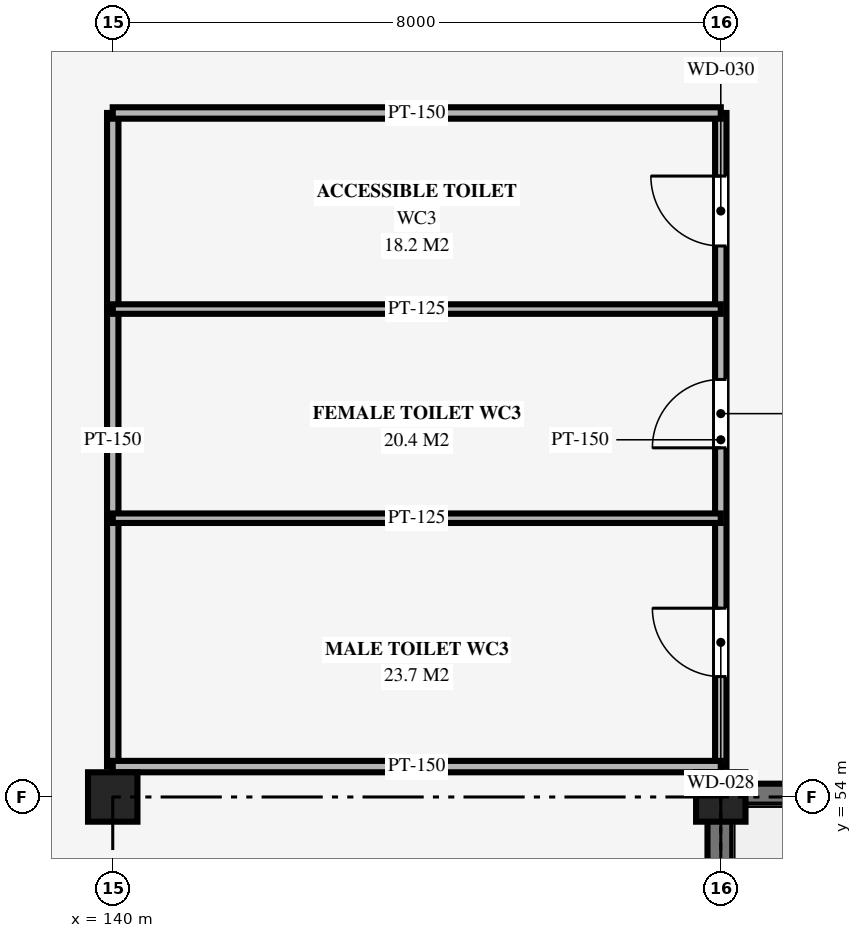
"""IFC4 building model, lengths in metres.
Left out: names, types, materials, properties, quantities, classifications, styles, units other than length and angle.
Written with IfcOpenShell. Run it as: python <this file> out.ifc"""

import sys

from ifc_helpers import new_model, si_unit, direction, frame, frame_2d, origin, origin_2d, place, context, subcontext, project, spatial, rectangle, extrude, element, fill, save


model = new_model("IFC4")
c1 = context("Model", 3, precision=1e-05, world=origin(), true_north=direction((0.0, 1.0)))
c2 = subcontext(c1, "Body", "Model", "MODEL_VIEW")
j1 = project(units=[si_unit("LENGTHUNIT", "METRE"), si_unit("PLANEANGLEUNIT", "RADIAN")], contexts=[c1])
p1 = place(None, origin())
s1 = spatial("IfcSite", under=j1, at=p1, CompositionType="ELEMENT")
p2 = place(p1, origin())
s2 = spatial("IfcBuilding", under=s1, at=p2, CompositionType="ELEMENT")
p3 = place(p2, origin())
s3 = spatial("IfcBuildingStorey", under=s2, at=p3, CompositionType="ELEMENT", Elevation=0.0)
for number, where, z_axis, x_axis in (
    (1, (140.0, 54.0, 0.0), (0.0, 0.0, 1.0), (1.0, 0.0, 0.0)),
    (2, (148.0, 54.0, 0.0), (0.0, 0.0, 1.0), (1.0, 0.0, 0.0)),
):
    element("IfcColumn", number, at=place(p3, frame(where, z_axis=z_axis, x_axis=x_axis)), inside=s3, PredefinedType="COLUMN", context=c2, shape_type="SweptSolid", body=[
        extrude(rectangle(XDim=0.65, YDim=0.65, at=origin_2d()), origin(), (0.0, 0.0, 1.0), 5.24),
    ])
p4 = place(p3, frame((148.0, 54.0, 0.0), z_axis=(0.0, 0.0, 1.0), x_axis=(1.0, 0.0, 0.0)))
e3 = element("IfcWall", 3, at=p4, inside=s3, PredefinedType="SHEAR", context=c2, shape_type="SweptSolid", body=[
    extrude(rectangle(XDim=8.0, YDim=0.35, at=frame_2d((4.0, 0.0))), origin(), (0.0, 0.0, 1.0), 5.38),
])
p5 = place(p3, frame((148.0, 42.0, 0.0), z_axis=(0.0, 0.0, 1.0), x_axis=(0.0, 1.0, 0.0)))
e4 = element("IfcWall", 4, at=p5, inside=s3, PredefinedType="SHEAR", context=c2, shape_type="SweptSolid", body=[
    extrude(rectangle(XDim=12.0, YDim=0.35, at=frame_2d((6.0, 0.0))), origin(), (0.0, 0.0, 1.0), 5.38),
])
p6 = place(p3, frame((140.0, 54.4, 0.0), z_axis=(0.0, 0.0, 1.0), x_axis=(0.0, 1.0, 0.0)))
e5 = element("IfcWall", 5, at=p6, inside=s3, PredefinedType="PARTITIONING", context=c2, shape_type="SweptSolid", body=[
    extrude(rectangle(XDim=8.6, YDim=0.15, at=frame_2d((4.3, 0.0))), origin(), (0.0, 0.0, 1.0), 4.2),
])
p7 = place(p3, frame((148.0, 54.4, 0.0), z_axis=(0.0, 0.0, 1.0), x_axis=(0.0, 1.0, 0.0)))
e6 = element("IfcWall", 6, at=p7, inside=s3, PredefinedType="PARTITIONING", context=c2, shape_type="SweptSolid", body=[
    extrude(rectangle(XDim=8.6, YDim=0.15, at=frame_2d((4.3, 0.0))), origin(), (0.0, 0.0, 1.0), 4.2),
])
p8 = place(p7, frame((1.184, 0.0, 0.0)))
e7 = element("IfcOpeningElement", 7, at=p8, cuts=e6, PredefinedType="OPENING", context=c2, shape_type="SweptSolid", body=[
    extrude(rectangle(XDim=0.9, YDim=2.1, at=frame_2d((0.45, 1.05))), frame((0.0, 0.085, 0.0), z_axis=(0.0, -1.0, 0.0), x_axis=(1.0, 0.0, 0.0)), (0.0, 0.0, 1.0), 0.17),
])
p9 = place(p7, frame((4.194, 0.0, 0.0)))
e8 = element("IfcOpeningElement", 8, at=p9, cuts=e6, PredefinedType="OPENING", context=c2, shape_type="SweptSolid", body=[
    extrude(rectangle(XDim=0.9, YDim=2.1, at=frame_2d((0.45, 1.05))), frame((0.0, 0.085, 0.0), z_axis=(0.0, -1.0, 0.0), x_axis=(1.0, 0.0, 0.0)), (0.0, 0.0, 1.0), 0.17),
])
p10 = place(p7, frame((6.85, 0.0, 0.0)))
e9 = element("IfcOpeningElement", 9, at=p10, cuts=e6, PredefinedType="OPENING", context=c2, shape_type="SweptSolid", body=[
    extrude(rectangle(XDim=0.92, YDim=2.1, at=frame_2d((0.46, 1.05))), frame((0.0, 0.085, 0.0), z_axis=(0.0, -1.0, 0.0), x_axis=(1.0, 0.0, 0.0)), (0.0, 0.0, 1.0), 0.17),
])
for number, where, z_axis, x_axis in (
    (10, (140.0, 63.0, 0.0), (0.0, 0.0, 1.0), (1.0, 0.0, 0.0)),
    (11, (140.0, 54.4, 0.0), (0.0, 0.0, 1.0), (1.0, 0.0, 0.0)),
):
    element("IfcWall", number, at=place(p3, frame(where, z_axis=z_axis, x_axis=x_axis)), inside=s3, PredefinedType="PARTITIONING", context=c2, shape_type="SweptSolid", body=[
        extrude(rectangle(XDim=8.0, YDim=0.15, at=frame_2d((4.0, 0.0))), origin(), (0.0, 0.0, 1.0), 4.2),
    ])
for number, where, z_axis, x_axis in (
    (12, (140.0, 57.668, 0.0), (0.0, 0.0, 1.0), (1.0, 0.0, 0.0)),
    (13, (140.0, 60.42, 0.0), (0.0, 0.0, 1.0), (1.0, 0.0, 0.0)),
):
    element("IfcWall", number, at=place(p3, frame(where, z_axis=z_axis, x_axis=x_axis)), inside=s3, PredefinedType="PARTITIONING", context=c2, shape_type="SweptSolid", body=[
        extrude(rectangle(XDim=8.0, YDim=0.125, at=frame_2d((4.0, 0.0))), origin(), (0.0, 0.0, 1.0), 4.2),
    ])
p11 = place(p8, origin())
e14 = element("IfcDoor", 14, at=p11, inside=s3, OperationType="SINGLE_SWING_RIGHT", PredefinedType="DOOR", context=c2, shape_type="SweptSolid", body=[
    extrude(rectangle(XDim=0.9, YDim=2.1, at=frame_2d((0.45, 1.05))), frame((0.0, 0.025, 0.0), z_axis=(0.0, -1.0, 0.0), x_axis=(1.0, 0.0, 0.0)), (0.0, 0.0, 1.0), 0.05),
])
fill(e7, e14)
p12 = place(p9, origin())
e15 = element("IfcDoor", 15, at=p12, inside=s3, OperationType="SINGLE_SWING_LEFT", PredefinedType="DOOR", context=c2, shape_type="SweptSolid", body=[
    extrude(rectangle(XDim=0.9, YDim=2.1, at=frame_2d((0.45, 1.05))), frame((0.0, 0.025, 0.0), z_axis=(0.0, -1.0, 0.0), x_axis=(1.0, 0.0, 0.0)), (0.0, 0.0, 1.0), 0.05),
])
fill(e8, e15)
p13 = place(p10, origin())
e16 = element("IfcDoor", 16, at=p13, inside=s3, OperationType="SINGLE_SWING_RIGHT", PredefinedType="DOOR", context=c2, shape_type="SweptSolid", body=[
    extrude(rectangle(XDim=0.92, YDim=2.1, at=frame_2d((0.46, 1.05))), frame((0.0, 0.025, 0.0), z_axis=(0.0, -1.0, 0.0), x_axis=(1.0, 0.0, 0.0)), (0.0, 0.0, 1.0), 0.05),
])
fill(e9, e16)
save(model, sys.argv[1])
